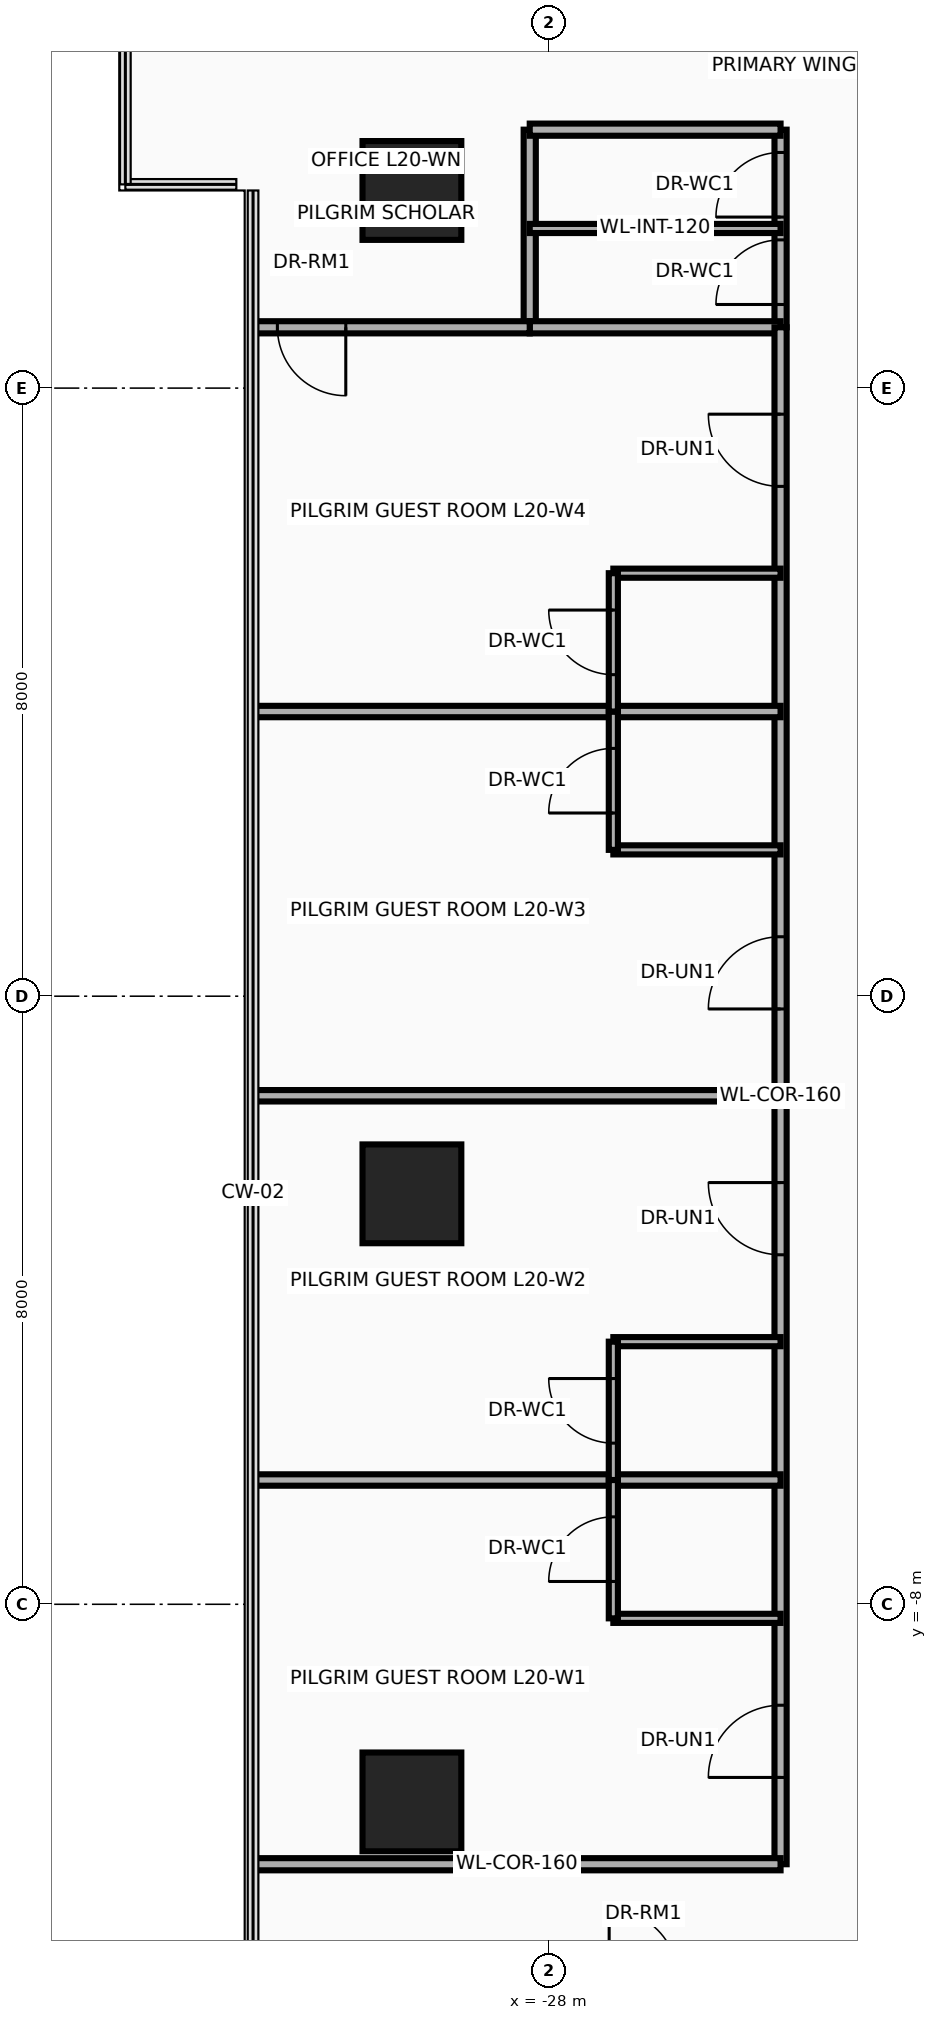
"""IFC4 building model, lengths in metres.
Left out: names, types, materials, properties, quantities, classifications, styles, units other than length and angle.
Written with IfcOpenShell. Run it as: python <this file> out.ifc"""

import sys

from ifc_helpers import new_model, si_unit, direction, frame, frame_2d, origin, origin_2d, place, context, subcontext, project, spatial, rectangle, circle, extrude, source, transform, mapped, element, fill, save


model = new_model("IFC4")
c1 = context("Model", 3, precision=1e-05, world=origin(), true_north=direction((0.0, 1.0)))
c2 = subcontext(c1, "Body", "Model", "MODEL_VIEW")
j1 = project(units=[si_unit("LENGTHUNIT", "METRE"), si_unit("PLANEANGLEUNIT", "RADIAN")], contexts=[c1])
p1 = place(None, origin())
s1 = spatial("IfcSite", under=j1, at=p1, CompositionType="ELEMENT")
p2 = place(p1, origin())
s2 = spatial("IfcBuilding", under=s1, at=p2, CompositionType="ELEMENT")
p3 = place(p2, frame((0.0, 0.0, 81.5)))
s3 = spatial("IfcBuildingStorey", under=s2, at=p3, CompositionType="ELEMENT", Elevation=81.5)
m1 = source(origin(), c2, "Body", "SweptSolid", [
    extrude(circle(Radius=0.65, at=origin_2d()), origin(), (0.0, 0.0, 1.0), 3.7),
])
for number, where, z_axis, x_axis in (
    (1, (-29.8, -10.6, 0.0), (0.0, 0.0, 1.0), (1.0, 0.0, 0.0)),
    (2, (-29.8, -2.6, 0.0), (0.0, 0.0, 1.0), (1.0, 0.0, 0.0)),
    (3, (-29.8, 10.6, 0.0), (0.0, 0.0, 1.0), (1.0, 0.0, 0.0)),
):
    element("IfcColumn", number, at=place(p3, frame(where, z_axis=z_axis, x_axis=x_axis)), inside=s3, PredefinedType="COLUMN", context=c2, shape_type="MappedRepresentation", body=[
        mapped(m1, transform((0.0, 0.0, 0.0), x_axis=(1.0, 0.0, 0.0), y_axis=(0.0, 1.0, 0.0), z_axis=(0.0, 0.0, 1.0), scale=1.0)),
    ])
p4 = place(p3, frame((-28.25, 8.8, 0.0), z_axis=(0.0, 0.0, 1.0), x_axis=(0.0, 1.0, 0.0)))
e4 = element("IfcWall", 4, at=p4, inside=s3, PredefinedType="PARTITIONING", context=c2, shape_type="SweptSolid", body=[
    extrude(rectangle(XDim=2.6, YDim=0.16, at=frame_2d((1.3, 0.0))), origin(), (0.0, 0.0, 1.0), 2.583),
])
p5 = place(p3, frame((-24.95, 8.8, 0.0), z_axis=(0.0, 0.0, 1.0), x_axis=(0.0, 1.0, 0.0)))
e5 = element("IfcWall", 5, at=p5, inside=s3, PredefinedType="PARTITIONING", context=c2, shape_type="SweptSolid", body=[
    extrude(rectangle(XDim=2.6, YDim=0.16, at=frame_2d((1.3, 0.0))), origin(), (0.0, 0.0, 1.0), 2.583),
])
p6 = place(p5, frame((0.3, 0.0, 0.0)))
e6 = element("IfcOpeningElement", 6, at=p6, cuts=e5, PredefinedType="OPENING", context=c2, shape_type="SweptSolid", body=[
    extrude(rectangle(XDim=0.85, YDim=2.1, at=frame_2d((0.425, 1.05))), frame((0.0, 0.095, 0.0), z_axis=(0.0, -1.0, 0.0), x_axis=(1.0, 0.0, 0.0)), (0.0, 0.0, 1.0), 0.19),
])
p7 = place(p5, frame((1.45, 0.0, 0.0)))
e7 = element("IfcOpeningElement", 7, at=p7, cuts=e5, PredefinedType="OPENING", context=c2, shape_type="SweptSolid", body=[
    extrude(rectangle(XDim=0.85, YDim=2.1, at=frame_2d((0.425, 1.05))), frame((0.0, 0.095, 0.0), z_axis=(0.0, -1.0, 0.0), x_axis=(1.0, 0.0, 0.0)), (0.0, 0.0, 1.0), 0.19),
])
for number, where, z_axis, x_axis in (
    (8, (-28.25, 8.8, 0.0), (0.0, 0.0, 1.0), (1.0, 0.0, 0.0)),
    (9, (-28.25, 11.4, 0.0), (0.0, 0.0, 1.0), (1.0, 0.0, 0.0)),
):
    element("IfcWall", number, at=place(p3, frame(where, z_axis=z_axis, x_axis=x_axis)), inside=s3, PredefinedType="PARTITIONING", context=c2, shape_type="SweptSolid", body=[
        extrude(rectangle(XDim=3.3, YDim=0.16, at=frame_2d((1.65, 0.0))), origin(), (0.0, 0.0, 1.0), 3.46),
    ])
p8 = place(p3, frame((-28.25, 10.1, 0.0), z_axis=(0.0, 0.0, 1.0), x_axis=(1.0, 0.0, 0.0)))
e10 = element("IfcWall", 10, at=p8, inside=s3, PredefinedType="PARTITIONING", context=c2, shape_type="SweptSolid", body=[
    extrude(rectangle(XDim=3.3, YDim=0.12, at=frame_2d((1.65, 0.0))), origin(), (0.0, 0.0, 1.0), 3.46),
])
p9 = place(p3, frame((-24.95, -11.42, 0.0), z_axis=(0.0, 0.0, 1.0), x_axis=(0.0, 1.0, 0.0)))
e11 = element("IfcWall", 11, at=p9, inside=s3, PredefinedType="PARTITIONING", context=c2, shape_type="SweptSolid", body=[
    extrude(rectangle(XDim=20.22, YDim=0.16, at=frame_2d((10.11, 0.0))), origin(), (0.0, 0.0, 1.0), 2.583),
])
p10 = place(p9, frame((1.142, 0.0, 0.0)))
e12 = element("IfcOpeningElement", 12, at=p10, cuts=e11, PredefinedType="OPENING", context=c2, shape_type="SweptSolid", body=[
    extrude(rectangle(XDim=0.95, YDim=2.15, at=frame_2d((0.475, 1.075))), frame((0.0, 0.095, 0.0), z_axis=(0.0, -1.0, 0.0), x_axis=(1.0, 0.0, 0.0)), (0.0, 0.0, 1.0), 0.19),
])
p11 = place(p9, frame((8.018, 0.0, 0.0)))
e13 = element("IfcOpeningElement", 13, at=p11, cuts=e11, PredefinedType="OPENING", context=c2, shape_type="SweptSolid", body=[
    extrude(rectangle(XDim=0.95, YDim=2.15, at=frame_2d((0.475, 1.075))), frame((0.0, 0.095, 0.0), z_axis=(0.0, -1.0, 0.0), x_axis=(1.0, 0.0, 0.0)), (0.0, 0.0, 1.0), 0.19),
])
p12 = place(p9, frame((11.252, 0.0, 0.0)))
e14 = element("IfcOpeningElement", 14, at=p12, cuts=e11, PredefinedType="OPENING", context=c2, shape_type="SweptSolid", body=[
    extrude(rectangle(XDim=0.95, YDim=2.15, at=frame_2d((0.475, 1.075))), frame((0.0, 0.095, 0.0), z_axis=(0.0, -1.0, 0.0), x_axis=(1.0, 0.0, 0.0)), (0.0, 0.0, 1.0), 0.19),
])
p13 = place(p9, frame((18.127, 0.0, 0.0)))
e15 = element("IfcOpeningElement", 15, at=p13, cuts=e11, PredefinedType="OPENING", context=c2, shape_type="SweptSolid", body=[
    extrude(rectangle(XDim=0.95, YDim=2.15, at=frame_2d((0.475, 1.075))), frame((0.0, 0.095, 0.0), z_axis=(0.0, -1.0, 0.0), x_axis=(1.0, 0.0, 0.0)), (0.0, 0.0, 1.0), 0.19),
])
p14 = place(p3, frame((-31.89, 8.8, 0.0), z_axis=(0.0, 0.0, 1.0), x_axis=(1.0, 0.0, 0.0)))
e16 = element("IfcWall", 16, at=p14, inside=s3, PredefinedType="PARTITIONING", context=c2, shape_type="SweptSolid", body=[
    extrude(rectangle(XDim=3.64, YDim=0.16, at=frame_2d((1.82, 0.0))), origin(), (0.0, 0.0, 1.0), 2.896),
])
p15 = place(p14, frame((0.32, 0.0, 0.0)))
e17 = element("IfcOpeningElement", 17, at=p15, cuts=e16, PredefinedType="OPENING", context=c2, shape_type="SweptSolid", body=[
    extrude(rectangle(XDim=0.9, YDim=2.1, at=frame_2d((0.45, 1.05))), frame((0.0, 0.095, 0.0), z_axis=(0.0, -1.0, 0.0), x_axis=(1.0, 0.0, 0.0)), (0.0, 0.0, 1.0), 0.19),
])
for number, where, z_axis, x_axis in (
    (18, (-31.89, -6.365, 0.0), (0.0, 0.0, 1.0), (1.0, 0.0, 0.0)),
    (19, (-31.89, -1.31, 0.0), (0.0, 0.0, 1.0), (1.0, 0.0, 0.0)),
    (20, (-31.89, 3.745, 0.0), (0.0, 0.0, 1.0), (1.0, 0.0, 0.0)),
):
    element("IfcWall", number, at=place(p3, frame(where, z_axis=z_axis, x_axis=x_axis)), inside=s3, PredefinedType="PARTITIONING", context=c2, shape_type="SweptSolid", body=[
        extrude(rectangle(XDim=6.94, YDim=0.15, at=frame_2d((3.47, 0.0))), origin(), (0.0, 0.0, 1.0), 2.896),
    ])
p16 = place(p3, frame((-27.15, -8.185, 0.0), z_axis=(0.0, 0.0, 1.0), x_axis=(1.0, 0.0, 0.0)))
e21 = element("IfcWall", 21, at=p16, inside=s3, PredefinedType="PARTITIONING", context=c2, shape_type="SweptSolid", body=[
    extrude(rectangle(XDim=2.2, YDim=0.12, at=frame_2d((1.1, 0.0))), origin(), (0.0, 0.0, 1.0), 3.46),
])
p17 = place(p3, frame((-27.15, -8.185, 0.0), z_axis=(0.0, 0.0, 1.0), x_axis=(0.0, 1.0, 0.0)))
e22 = element("IfcWall", 22, at=p17, inside=s3, PredefinedType="PARTITIONING", context=c2, shape_type="SweptSolid", body=[
    extrude(rectangle(XDim=1.82, YDim=0.12, at=frame_2d((0.91, 0.0))), origin(), (0.0, 0.0, 1.0), 2.979),
])
p18 = place(p17, frame((0.485, 0.0, 0.0)))
e23 = element("IfcOpeningElement", 23, at=p18, cuts=e22, PredefinedType="OPENING", context=c2, shape_type="SweptSolid", body=[
    extrude(rectangle(XDim=0.85, YDim=2.1, at=frame_2d((0.425, 1.05))), frame((0.0, 0.075, 0.0), z_axis=(0.0, -1.0, 0.0), x_axis=(1.0, 0.0, 0.0)), (0.0, 0.0, 1.0), 0.15),
])
p19 = place(p3, frame((-27.15, -4.545, 0.0), z_axis=(0.0, 0.0, 1.0), x_axis=(1.0, 0.0, 0.0)))
e24 = element("IfcWall", 24, at=p19, inside=s3, PredefinedType="PARTITIONING", context=c2, shape_type="SweptSolid", body=[
    extrude(rectangle(XDim=2.2, YDim=0.12, at=frame_2d((1.1, 0.0))), origin(), (0.0, 0.0, 1.0), 2.979),
])
p20 = place(p3, frame((-27.15, -6.365, 0.0), z_axis=(0.0, 0.0, 1.0), x_axis=(0.0, 1.0, 0.0)))
e25 = element("IfcWall", 25, at=p20, inside=s3, PredefinedType="PARTITIONING", context=c2, shape_type="SweptSolid", body=[
    extrude(rectangle(XDim=1.82, YDim=0.12, at=frame_2d((0.91, 0.0))), origin(), (0.0, 0.0, 1.0), 2.979),
])
p21 = place(p20, frame((0.485, 0.0, 0.0)))
e26 = element("IfcOpeningElement", 26, at=p21, cuts=e25, PredefinedType="OPENING", context=c2, shape_type="SweptSolid", body=[
    extrude(rectangle(XDim=0.85, YDim=2.1, at=frame_2d((0.425, 1.05))), frame((0.0, 0.075, 0.0), z_axis=(0.0, -1.0, 0.0), x_axis=(1.0, 0.0, 0.0)), (0.0, 0.0, 1.0), 0.15),
])
p22 = place(p3, frame((-27.15, 1.925, 0.0), z_axis=(0.0, 0.0, 1.0), x_axis=(1.0, 0.0, 0.0)))
e27 = element("IfcWall", 27, at=p22, inside=s3, PredefinedType="PARTITIONING", context=c2, shape_type="SweptSolid", body=[
    extrude(rectangle(XDim=2.2, YDim=0.12, at=frame_2d((1.1, 0.0))), origin(), (0.0, 0.0, 1.0), 3.46),
])
p23 = place(p3, frame((-27.15, 1.925, 0.0), z_axis=(0.0, 0.0, 1.0), x_axis=(0.0, 1.0, 0.0)))
e28 = element("IfcWall", 28, at=p23, inside=s3, PredefinedType="PARTITIONING", context=c2, shape_type="SweptSolid", body=[
    extrude(rectangle(XDim=1.82, YDim=0.12, at=frame_2d((0.91, 0.0))), origin(), (0.0, 0.0, 1.0), 2.979),
])
p24 = place(p23, frame((0.485, 0.0, 0.0)))
e29 = element("IfcOpeningElement", 29, at=p24, cuts=e28, PredefinedType="OPENING", context=c2, shape_type="SweptSolid", body=[
    extrude(rectangle(XDim=0.85, YDim=2.1, at=frame_2d((0.425, 1.05))), frame((0.0, 0.075, 0.0), z_axis=(0.0, -1.0, 0.0), x_axis=(1.0, 0.0, 0.0)), (0.0, 0.0, 1.0), 0.15),
])
p25 = place(p3, frame((-27.15, 5.565, 0.0), z_axis=(0.0, 0.0, 1.0), x_axis=(1.0, 0.0, 0.0)))
e30 = element("IfcWall", 30, at=p25, inside=s3, PredefinedType="PARTITIONING", context=c2, shape_type="SweptSolid", body=[
    extrude(rectangle(XDim=2.2, YDim=0.12, at=frame_2d((1.1, 0.0))), origin(), (0.0, 0.0, 1.0), 3.46),
])
p26 = place(p3, frame((-27.15, 3.745, 0.0), z_axis=(0.0, 0.0, 1.0), x_axis=(0.0, 1.0, 0.0)))
e31 = element("IfcWall", 31, at=p26, inside=s3, PredefinedType="PARTITIONING", context=c2, shape_type="SweptSolid", body=[
    extrude(rectangle(XDim=1.82, YDim=0.12, at=frame_2d((0.91, 0.0))), origin(), (0.0, 0.0, 1.0), 2.979),
])
p27 = place(p26, frame((0.485, 0.0, 0.0)))
e32 = element("IfcOpeningElement", 32, at=p27, cuts=e31, PredefinedType="OPENING", context=c2, shape_type="SweptSolid", body=[
    extrude(rectangle(XDim=0.85, YDim=2.1, at=frame_2d((0.425, 1.05))), frame((0.0, 0.075, 0.0), z_axis=(0.0, -1.0, 0.0), x_axis=(1.0, 0.0, 0.0)), (0.0, 0.0, 1.0), 0.15),
])
p28 = place(p3, frame((-31.89, -11.42, 0.0), z_axis=(0.0, 0.0, 1.0), x_axis=(1.0, 0.0, 0.0)))
e33 = element("IfcWall", 33, at=p28, inside=s3, PredefinedType="PARTITIONING", context=c2, shape_type="SweptSolid", body=[
    extrude(rectangle(XDim=6.94, YDim=0.16, at=frame_2d((3.47, 0.0))), origin(), (0.0, 0.0, 1.0), 3.46),
])
p29 = place(p6, origin())
e34 = element("IfcDoor", 34, at=p29, inside=s3, OperationType="SINGLE_SWING_LEFT", PredefinedType="DOOR", context=c2, shape_type="SweptSolid", body=[
    extrude(rectangle(XDim=0.85, YDim=2.1, at=frame_2d((0.425, 1.05))), frame((0.0, 0.025, 0.0), z_axis=(0.0, -1.0, 0.0), x_axis=(1.0, 0.0, 0.0)), (0.0, 0.0, 1.0), 0.05),
])
fill(e6, e34)
p30 = place(p7, origin())
e35 = element("IfcDoor", 35, at=p30, inside=s3, OperationType="SINGLE_SWING_RIGHT", PredefinedType="DOOR", context=c2, shape_type="SweptSolid", body=[
    extrude(rectangle(XDim=0.85, YDim=2.1, at=frame_2d((0.425, 1.05))), frame((0.0, 0.025, 0.0), z_axis=(0.0, -1.0, 0.0), x_axis=(1.0, 0.0, 0.0)), (0.0, 0.0, 1.0), 0.05),
])
fill(e7, e35)
p31 = place(p15, frame((0.9, 0.0, 0.0), z_axis=(0.0, 0.0, 1.0), x_axis=(-1.0, 0.0, 0.0)))
e36 = element("IfcDoor", 36, at=p31, inside=s3, OperationType="SINGLE_SWING_LEFT", PredefinedType="DOOR", context=c2, shape_type="SweptSolid", body=[
    extrude(rectangle(XDim=0.9, YDim=2.1, at=frame_2d((0.45, 1.05))), frame((0.0, 0.025, 0.0), z_axis=(0.0, -1.0, 0.0), x_axis=(1.0, 0.0, 0.0)), (0.0, 0.0, 1.0), 0.05),
])
fill(e17, e36)
p32 = place(p10, origin())
e37 = element("IfcDoor", 37, at=p32, inside=s3, OperationType="SINGLE_SWING_RIGHT", PredefinedType="DOOR", context=c2, shape_type="SweptSolid", body=[
    extrude(rectangle(XDim=0.95, YDim=2.15, at=frame_2d((0.475, 1.075))), frame((0.0, 0.025, 0.0), z_axis=(0.0, -1.0, 0.0), x_axis=(1.0, 0.0, 0.0)), (0.0, 0.0, 1.0), 0.05),
])
fill(e12, e37)
p33 = place(p18, origin())
e38 = element("IfcDoor", 38, at=p33, inside=s3, OperationType="SINGLE_SWING_LEFT", PredefinedType="DOOR", context=c2, shape_type="SweptSolid", body=[
    extrude(rectangle(XDim=0.85, YDim=2.1, at=frame_2d((0.425, 1.05))), frame((0.0, 0.025, 0.0), z_axis=(0.0, -1.0, 0.0), x_axis=(1.0, 0.0, 0.0)), (0.0, 0.0, 1.0), 0.05),
])
fill(e23, e38)
p34 = place(p11, origin())
e39 = element("IfcDoor", 39, at=p34, inside=s3, OperationType="SINGLE_SWING_RIGHT", PredefinedType="DOOR", context=c2, shape_type="SweptSolid", body=[
    extrude(rectangle(XDim=0.95, YDim=2.15, at=frame_2d((0.475, 1.075))), frame((0.0, 0.025, 0.0), z_axis=(0.0, -1.0, 0.0), x_axis=(1.0, 0.0, 0.0)), (0.0, 0.0, 1.0), 0.05),
])
fill(e13, e39)
p35 = place(p21, origin())
e40 = element("IfcDoor", 40, at=p35, inside=s3, OperationType="SINGLE_SWING_LEFT", PredefinedType="DOOR", context=c2, shape_type="SweptSolid", body=[
    extrude(rectangle(XDim=0.85, YDim=2.1, at=frame_2d((0.425, 1.05))), frame((0.0, 0.025, 0.0), z_axis=(0.0, -1.0, 0.0), x_axis=(1.0, 0.0, 0.0)), (0.0, 0.0, 1.0), 0.05),
])
fill(e26, e40)
p36 = place(p12, origin())
e41 = element("IfcDoor", 41, at=p36, inside=s3, OperationType="SINGLE_SWING_RIGHT", PredefinedType="DOOR", context=c2, shape_type="SweptSolid", body=[
    extrude(rectangle(XDim=0.95, YDim=2.15, at=frame_2d((0.475, 1.075))), frame((0.0, 0.025, 0.0), z_axis=(0.0, -1.0, 0.0), x_axis=(1.0, 0.0, 0.0)), (0.0, 0.0, 1.0), 0.05),
])
fill(e14, e41)
p37 = place(p24, origin())
e42 = element("IfcDoor", 42, at=p37, inside=s3, OperationType="SINGLE_SWING_LEFT", PredefinedType="DOOR", context=c2, shape_type="SweptSolid", body=[
    extrude(rectangle(XDim=0.85, YDim=2.1, at=frame_2d((0.425, 1.05))), frame((0.0, 0.025, 0.0), z_axis=(0.0, -1.0, 0.0), x_axis=(1.0, 0.0, 0.0)), (0.0, 0.0, 1.0), 0.05),
])
fill(e29, e42)
p38 = place(p13, origin())
e43 = element("IfcDoor", 43, at=p38, inside=s3, OperationType="SINGLE_SWING_RIGHT", PredefinedType="DOOR", context=c2, shape_type="SweptSolid", body=[
    extrude(rectangle(XDim=0.95, YDim=2.15, at=frame_2d((0.475, 1.075))), frame((0.0, 0.025, 0.0), z_axis=(0.0, -1.0, 0.0), x_axis=(1.0, 0.0, 0.0)), (0.0, 0.0, 1.0), 0.05),
])
fill(e15, e43)
p39 = place(p27, origin())
e44 = element("IfcDoor", 44, at=p39, inside=s3, OperationType="SINGLE_SWING_LEFT", PredefinedType="DOOR", context=c2, shape_type="SweptSolid", body=[
    extrude(rectangle(XDim=0.85, YDim=2.1, at=frame_2d((0.425, 1.05))), frame((0.0, 0.025, 0.0), z_axis=(0.0, -1.0, 0.0), x_axis=(1.0, 0.0, 0.0)), (0.0, 0.0, 1.0), 0.05),
])
fill(e32, e44)
save(model, sys.argv[1])
